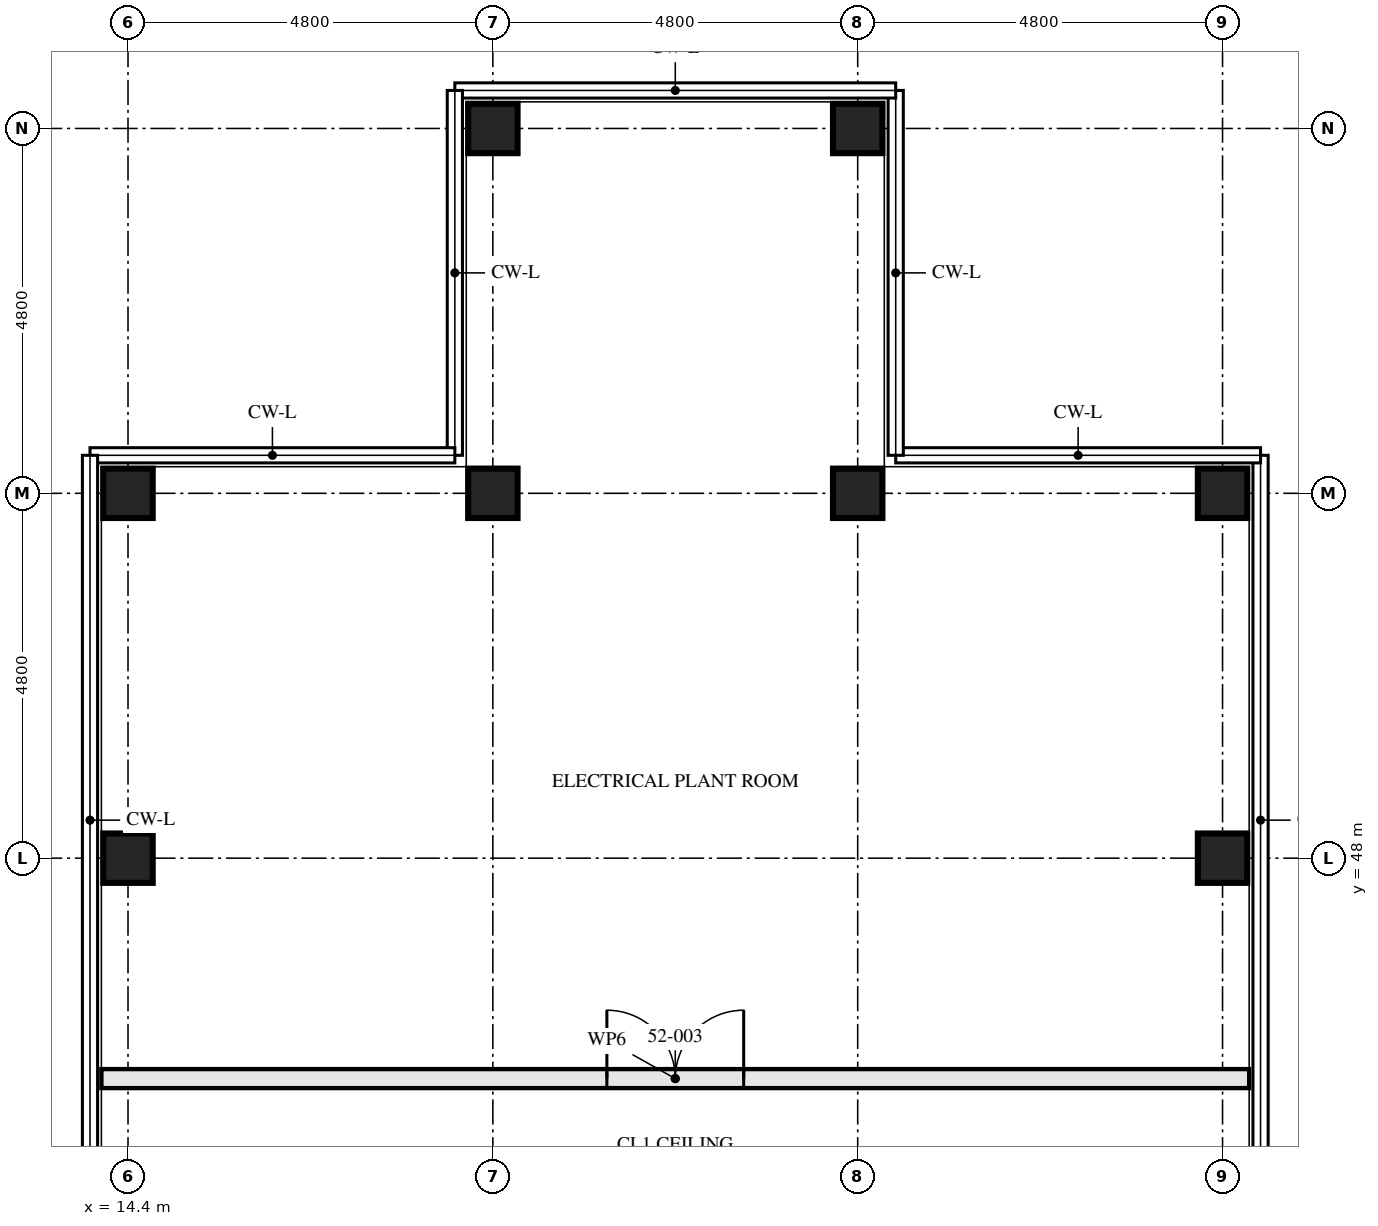
"""IFC4 building model, lengths in metres.
Left out: names, types, materials, properties, quantities, classifications, styles, units other than length and angle.
Written with IfcOpenShell. Run it as: python <this file> out.ifc"""

import sys

from ifc_helpers import new_model, si_unit, direction, frame, frame_2d, origin, origin_2d, place, context, subcontext, project, spatial, rectangle, hollow_rectangle, extrude, element, fill, save


model = new_model("IFC4")
c1 = context("Model", 3, precision=1e-05, world=origin(), true_north=direction((0.0, 1.0)))
c2 = subcontext(c1, "Body", "Model", "MODEL_VIEW")
j1 = project(units=[si_unit("LENGTHUNIT", "METRE"), si_unit("PLANEANGLEUNIT", "RADIAN")], contexts=[c1])
p1 = place(None, origin())
s1 = spatial("IfcSite", under=j1, at=p1, CompositionType="ELEMENT")
p2 = place(p1, origin())
s2 = spatial("IfcBuilding", under=s1, at=p2, CompositionType="ELEMENT")
p3 = place(p2, frame((0.0, 0.0, 190.0)))
s3 = spatial("IfcBuildingStorey", under=s2, at=p3, CompositionType="ELEMENT", Elevation=190.0)
for number, where, z_axis, x_axis in (
    (1, (14.4, 48.0, 0.0), (0.0, 0.0, 1.0), (1.0, 0.0, 0.0)),
    (2, (14.4, 52.8, 0.0), (0.0, 0.0, 1.0), (0.0, 1.0, 0.0)),
    (3, (19.2, 52.8, 0.0), (0.0, 0.0, 1.0), (0.0, 1.0, 0.0)),
    (4, (19.2, 57.6, 0.0), (0.0, 0.0, 1.0), (0.0, 1.0, 0.0)),
    (5, (24.0, 52.8, 0.0), (0.0, 0.0, 1.0), (0.0, 1.0, 0.0)),
    (6, (24.0, 57.6, 0.0), (0.0, 0.0, 1.0), (0.0, 1.0, 0.0)),
    (7, (28.8, 48.0, 0.0), (0.0, 0.0, 1.0), (1.0, 0.0, 0.0)),
    (8, (28.8, 52.8, 0.0), (0.0, 0.0, 1.0), (0.0, 1.0, 0.0)),
):
    element("IfcColumn", number, at=place(p3, frame(where, z_axis=z_axis, x_axis=x_axis)), inside=s3, PredefinedType="COLUMN", context=c2, shape_type="SweptSolid", body=[
        extrude(hollow_rectangle(XDim=0.65, YDim=0.65, WallThickness=0.08, at=origin_2d()), origin(), (0.0, 0.0, 1.0), 4.33),
    ])
p4 = place(p3, frame((29.15, 45.1, 0.0), z_axis=(0.0, 0.0, 1.0), x_axis=(-1.0, 0.0, 0.0)))
e9 = element("IfcWall", 9, at=p4, inside=s3, PredefinedType="SOLIDWALL", context=c2, shape_type="SweptSolid", body=[
    extrude(rectangle(XDim=15.1, YDim=0.25, at=frame_2d((7.55, 0.0))), origin(), (0.0, 0.0, 1.0), 3.12),
])
p5 = place(p4, frame((6.65, 0.0, 0.0)))
e10 = element("IfcOpeningElement", 10, at=p5, cuts=e9, PredefinedType="OPENING", context=c2, shape_type="SweptSolid", body=[
    extrude(rectangle(XDim=1.8, YDim=2.4, at=frame_2d((0.9, 1.2))), frame((0.0, 0.135, 0.0), z_axis=(0.0, -1.0, 0.0), x_axis=(1.0, 0.0, 0.0)), (0.0, 0.0, 1.0), 0.271),
])
p6 = place(p5, frame((1.8, 0.0, 0.0), z_axis=(0.0, 0.0, 1.0), x_axis=(-1.0, 0.0, 0.0)))
e11 = element("IfcDoor", 11, at=p6, inside=s3, OperationType="DOUBLE_DOOR_SINGLE_SWING", PredefinedType="DOOR", context=c2, shape_type="SweptSolid", body=[
    extrude(rectangle(XDim=1.8, YDim=2.4, at=frame_2d((0.9, 1.2))), frame((0.0, 0.032, 0.0), z_axis=(0.0, -1.0, 0.0), x_axis=(1.0, 0.0, 0.0)), (0.0, 0.0, 1.0), 0.064),
])
fill(e10, e11)
save(model, sys.argv[1])
